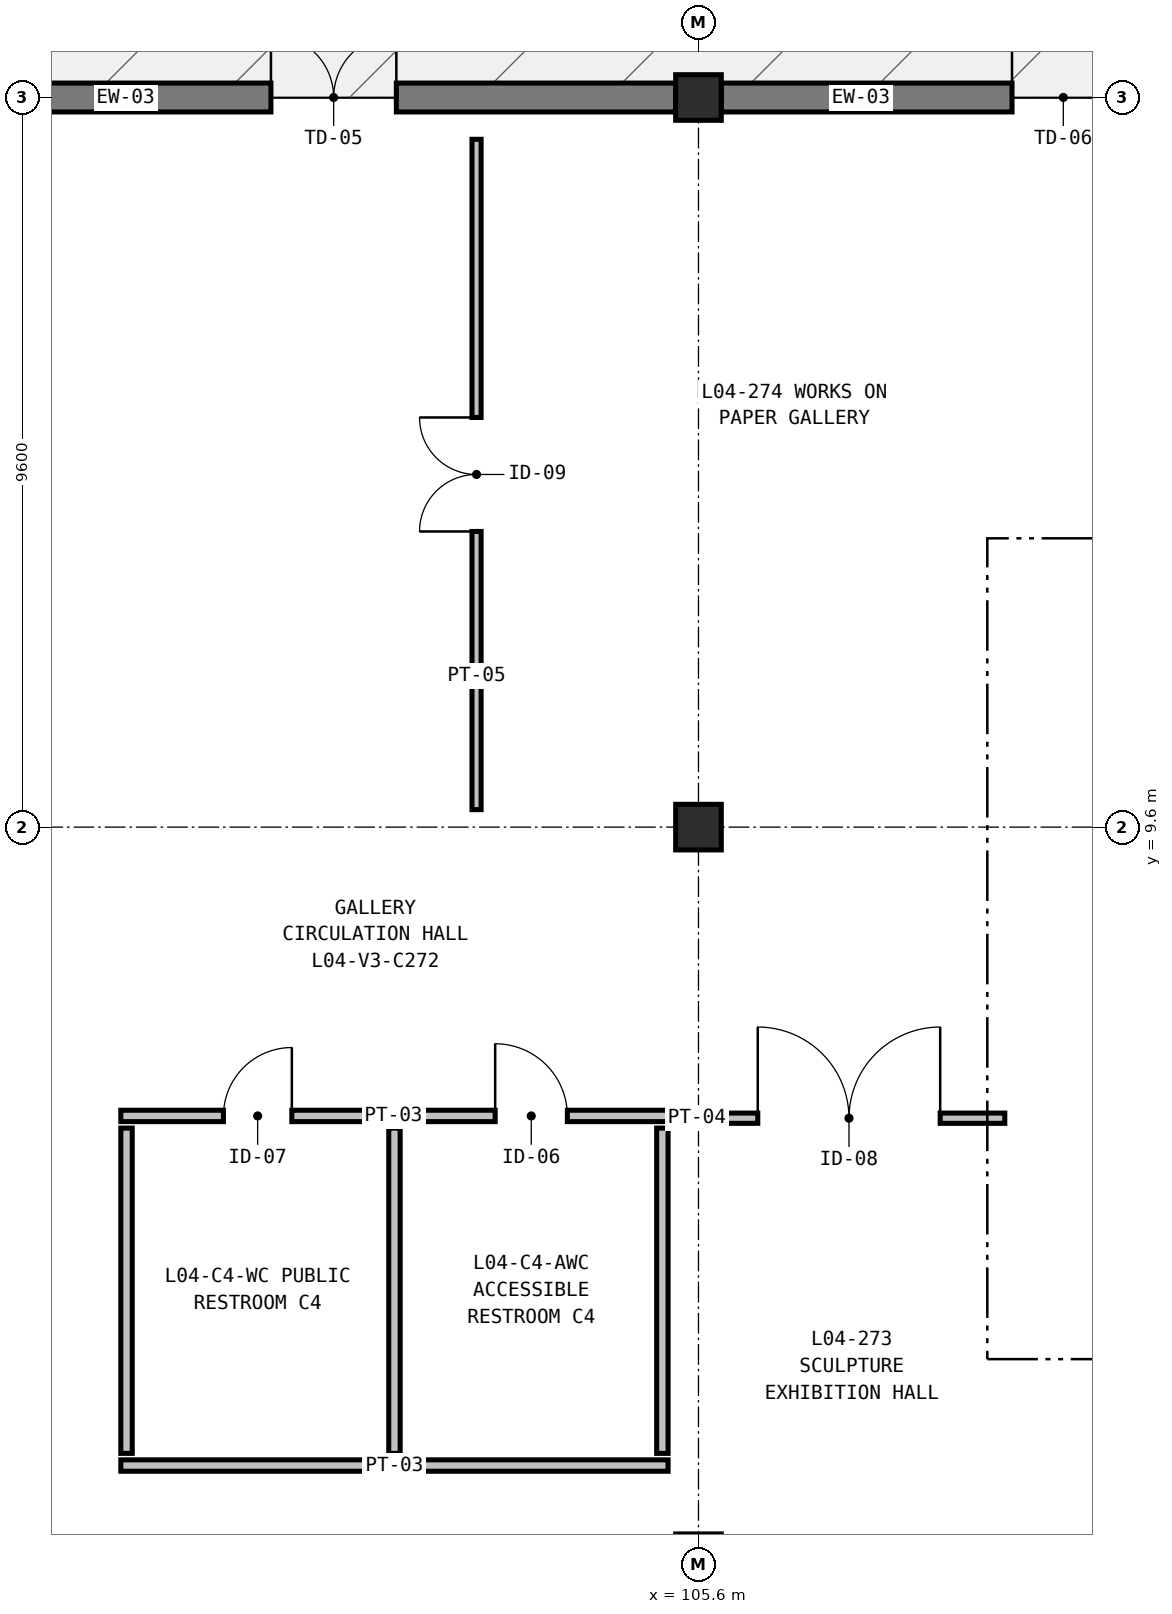
"""IFC4 building model, lengths in metres.
Left out: names, types, materials, properties, quantities, classifications, styles, units other than length and angle.
Written with IfcOpenShell. Run it as: python <this file> out.ifc"""

import sys

from ifc_helpers import new_model, si_unit, direction, frame, frame_2d, origin, origin_2d, place, context, subcontext, project, spatial, rectangle, extrude, element, fill, save


model = new_model("IFC4")
c1 = context("Model", 3, precision=1e-05, world=origin(), true_north=direction((0.0, 1.0)))
c2 = subcontext(c1, "Body", "Model", "MODEL_VIEW")
j1 = project(units=[si_unit("LENGTHUNIT", "METRE"), si_unit("PLANEANGLEUNIT", "RADIAN")], contexts=[c1])
p1 = place(None, origin())
s1 = spatial("IfcSite", under=j1, at=p1, CompositionType="ELEMENT")
p2 = place(p1, origin())
s2 = spatial("IfcBuilding", under=s1, at=p2, CompositionType="ELEMENT")
p3 = place(p2, frame((0.0, 0.0, 22.2)))
s3 = spatial("IfcBuildingStorey", under=s2, at=p3, CompositionType="ELEMENT", Elevation=22.2)
for number, where, z_axis, x_axis in (
    (1, (105.6, 9.6, 0.0), (0.0, 0.0, 1.0), (1.0, 0.0, 0.0)),
    (2, (105.6, 19.2, 0.0), (0.0, 0.0, 1.0), (1.0, 0.0, 0.0)),
):
    element("IfcColumn", number, at=place(p3, frame(where, z_axis=z_axis, x_axis=x_axis)), inside=s3, PredefinedType="COLUMN", context=c2, shape_type="SweptSolid", body=[
        extrude(rectangle(XDim=0.6, YDim=0.6, at=origin_2d()), origin(), (0.0, 0.0, 1.0), 4.8),
    ])
p4 = place(p3, frame((96.3, 19.2, 0.0), z_axis=(0.0, 0.0, 1.0), x_axis=(1.0, 0.0, 0.0)))
e3 = element("IfcWall", 3, at=p4, inside=s3, PredefinedType="SOLIDWALL", context=c2, shape_type="SweptSolid", body=[
    extrude(rectangle(XDim=9.0, YDim=0.38, at=frame_2d((4.5, 0.0))), origin(), (0.0, 0.0, 1.0), 4.5),
])
p5 = place(p4, frame((3.675, 0.0, 0.0)))
e4 = element("IfcOpeningElement", 4, at=p5, cuts=e3, PredefinedType="OPENING", context=c2, shape_type="SweptSolid", body=[
    extrude(rectangle(XDim=1.65, YDim=2.35, at=frame_2d((0.825, 1.175))), frame((0.0, 0.2, 0.0), z_axis=(0.0, -1.0, 0.0), x_axis=(1.0, 0.0, 0.0)), (0.0, 0.0, 1.0), 0.4),
])
p6 = place(p3, frame((105.9, 19.2, 0.0), z_axis=(0.0, 0.0, 1.0), x_axis=(1.0, 0.0, 0.0)))
e5 = element("IfcWall", 5, at=p6, inside=s3, PredefinedType="SOLIDWALL", context=c2, shape_type="SweptSolid", body=[
    extrude(rectangle(XDim=9.0, YDim=0.38, at=frame_2d((4.5, 0.0))), origin(), (0.0, 0.0, 1.0), 4.5),
])
p7 = place(p6, frame((3.825, 0.0, 0.0)))
e6 = element("IfcOpeningElement", 6, at=p7, cuts=e5, PredefinedType="OPENING", context=c2, shape_type="SweptSolid", body=[
    extrude(rectangle(XDim=1.35, YDim=2.2, at=frame_2d((0.675, 1.1))), frame((0.0, 0.2, 0.0), z_axis=(0.0, -1.0, 0.0), x_axis=(1.0, 0.0, 0.0)), (0.0, 0.0, 1.0), 0.4),
])
p8 = place(p3, frame((98.0, 5.8, 0.0), z_axis=(0.0, 0.0, 1.0), x_axis=(1.0, 0.0, 0.0)))
e7 = element("IfcWall", 7, at=p8, inside=s3, PredefinedType="PARTITIONING", context=c2, shape_type="SweptSolid", body=[
    extrude(rectangle(XDim=7.2, YDim=0.15, at=frame_2d((3.6, 0.0))), origin(), (0.0, 0.0, 1.0), 4.5),
])
p9 = place(p8, frame((1.35, 0.0, 0.0)))
e8 = element("IfcOpeningElement", 8, at=p9, cuts=e7, PredefinedType="OPENING", context=c2, shape_type="SweptSolid", body=[
    extrude(rectangle(XDim=0.9, YDim=2.1, at=frame_2d((0.45, 1.05))), frame((0.0, 0.085, 0.0), z_axis=(0.0, -1.0, 0.0), x_axis=(1.0, 0.0, 0.0)), (0.0, 0.0, 1.0), 0.17),
])
p10 = place(p8, frame((4.925, 0.0, 0.0)))
e9 = element("IfcOpeningElement", 9, at=p10, cuts=e7, PredefinedType="OPENING", context=c2, shape_type="SweptSolid", body=[
    extrude(rectangle(XDim=0.95, YDim=2.15, at=frame_2d((0.475, 1.075))), frame((0.0, 0.085, 0.0), z_axis=(0.0, -1.0, 0.0), x_axis=(1.0, 0.0, 0.0)), (0.0, 0.0, 1.0), 0.17),
])
p11 = place(p3, frame((98.0, 1.2, 0.0), z_axis=(0.0, 0.0, 1.0), x_axis=(1.0, 0.0, 0.0)))
e10 = element("IfcWall", 10, at=p11, inside=s3, PredefinedType="PARTITIONING", context=c2, shape_type="SweptSolid", body=[
    extrude(rectangle(XDim=7.2, YDim=0.15, at=frame_2d((3.6, 0.0))), origin(), (0.0, 0.0, 1.0), 4.5),
])
for number, where, z_axis, x_axis in (
    (11, (98.075, 1.36, 0.0), (0.0, 0.0, 1.0), (0.0, 1.0, 0.0)),
    (12, (101.6, 1.36, 0.0), (0.0, 0.0, 1.0), (0.0, 1.0, 0.0)),
    (13, (105.125, 1.36, 0.0), (0.0, 0.0, 1.0), (0.0, 1.0, 0.0)),
):
    element("IfcWall", number, at=place(p3, frame(where, z_axis=z_axis, x_axis=x_axis)), inside=s3, PredefinedType="PARTITIONING", context=c2, shape_type="SweptSolid", body=[
        extrude(rectangle(XDim=4.28, YDim=0.15, at=frame_2d((2.14, 0.0))), origin(), (0.0, 0.0, 1.0), 4.5),
    ])
p12 = place(p3, frame((105.53, 5.77, 0.0), z_axis=(0.0, 0.0, 1.0), x_axis=(1.0, 0.0, 0.0)))
e14 = element("IfcWall", 14, at=p12, inside=s3, PredefinedType="PARTITIONING", context=c2, shape_type="SweptSolid", body=[
    extrude(rectangle(XDim=4.1, YDim=0.135, at=frame_2d((2.05, 0.0))), origin(), (0.0, 0.0, 1.0), 4.5),
])
p13 = place(p12, frame((0.85, 0.0, 0.0)))
e15 = element("IfcOpeningElement", 15, at=p13, cuts=e14, PredefinedType="OPENING", context=c2, shape_type="SweptSolid", body=[
    extrude(rectangle(XDim=2.4, YDim=2.6, at=frame_2d((1.2, 1.3))), frame((0.0, 0.077, 0.0), z_axis=(0.0, -1.0, 0.0), x_axis=(1.0, 0.0, 0.0)), (0.0, 0.0, 1.0), 0.155),
])
p14 = place(p3, frame((102.68, 9.83, 0.0), z_axis=(0.0, 0.0, 1.0), x_axis=(0.0, 1.0, 0.0)))
e16 = element("IfcWall", 16, at=p14, inside=s3, PredefinedType="PARTITIONING", context=c2, shape_type="SweptSolid", body=[
    extrude(rectangle(XDim=8.82, YDim=0.12, at=frame_2d((4.41, 0.0))), origin(), (0.0, 0.0, 1.0), 4.5),
])
p15 = place(p14, frame((3.66, 0.0, 0.0)))
e17 = element("IfcOpeningElement", 17, at=p15, cuts=e16, PredefinedType="OPENING", context=c2, shape_type="SweptSolid", body=[
    extrude(rectangle(XDim=1.5, YDim=2.3, at=frame_2d((0.75, 1.15))), frame((0.0, 0.07, 0.0), z_axis=(0.0, -1.0, 0.0), x_axis=(1.0, 0.0, 0.0)), (0.0, 0.0, 1.0), 0.14),
])
p16 = place(p5, origin())
e18 = element("IfcDoor", 18, at=p16, inside=s3, OperationType="DOUBLE_DOOR_SINGLE_SWING", PredefinedType="DOOR", context=c2, shape_type="SweptSolid", body=[
    extrude(rectangle(XDim=1.65, YDim=2.35, at=frame_2d((0.825, 1.175))), frame((0.0, 0.025, 0.0), z_axis=(0.0, -1.0, 0.0), x_axis=(1.0, 0.0, 0.0)), (0.0, 0.0, 1.0), 0.05),
])
fill(e4, e18)
p17 = place(p7, origin())
e19 = element("IfcDoor", 19, at=p17, inside=s3, OperationType="SINGLE_SWING_LEFT", PredefinedType="DOOR", context=c2, shape_type="SweptSolid", body=[
    extrude(rectangle(XDim=1.35, YDim=2.2, at=frame_2d((0.675, 1.1))), frame((0.0, 0.025, 0.0), z_axis=(0.0, -1.0, 0.0), x_axis=(1.0, 0.0, 0.0)), (0.0, 0.0, 1.0), 0.05),
])
fill(e6, e19)
p18 = place(p9, origin())
e20 = element("IfcDoor", 20, at=p18, inside=s3, OperationType="SINGLE_SWING_RIGHT", PredefinedType="DOOR", context=c2, shape_type="SweptSolid", body=[
    extrude(rectangle(XDim=0.9, YDim=2.1, at=frame_2d((0.45, 1.05))), frame((0.0, 0.025, 0.0), z_axis=(0.0, -1.0, 0.0), x_axis=(1.0, 0.0, 0.0)), (0.0, 0.0, 1.0), 0.05),
])
fill(e8, e20)
p19 = place(p10, origin())
e21 = element("IfcDoor", 21, at=p19, inside=s3, OperationType="SINGLE_SWING_LEFT", PredefinedType="DOOR", context=c2, shape_type="SweptSolid", body=[
    extrude(rectangle(XDim=0.95, YDim=2.15, at=frame_2d((0.475, 1.075))), frame((0.0, 0.025, 0.0), z_axis=(0.0, -1.0, 0.0), x_axis=(1.0, 0.0, 0.0)), (0.0, 0.0, 1.0), 0.05),
])
fill(e9, e21)
p20 = place(p13, origin())
e22 = element("IfcDoor", 22, at=p20, inside=s3, OperationType="DOUBLE_DOOR_SINGLE_SWING", PredefinedType="DOOR", context=c2, shape_type="SweptSolid", body=[
    extrude(rectangle(XDim=2.4, YDim=2.6, at=frame_2d((1.2, 1.3))), frame((0.0, 0.025, 0.0), z_axis=(0.0, -1.0, 0.0), x_axis=(1.0, 0.0, 0.0)), (0.0, 0.0, 1.0), 0.05),
])
fill(e15, e22)
p21 = place(p15, origin())
e23 = element("IfcDoor", 23, at=p21, inside=s3, OperationType="DOUBLE_DOOR_SINGLE_SWING", PredefinedType="DOOR", context=c2, shape_type="SweptSolid", body=[
    extrude(rectangle(XDim=1.5, YDim=2.3, at=frame_2d((0.75, 1.15))), frame((0.0, 0.025, 0.0), z_axis=(0.0, -1.0, 0.0), x_axis=(1.0, 0.0, 0.0)), (0.0, 0.0, 1.0), 0.05),
])
fill(e17, e23)
save(model, sys.argv[1])
